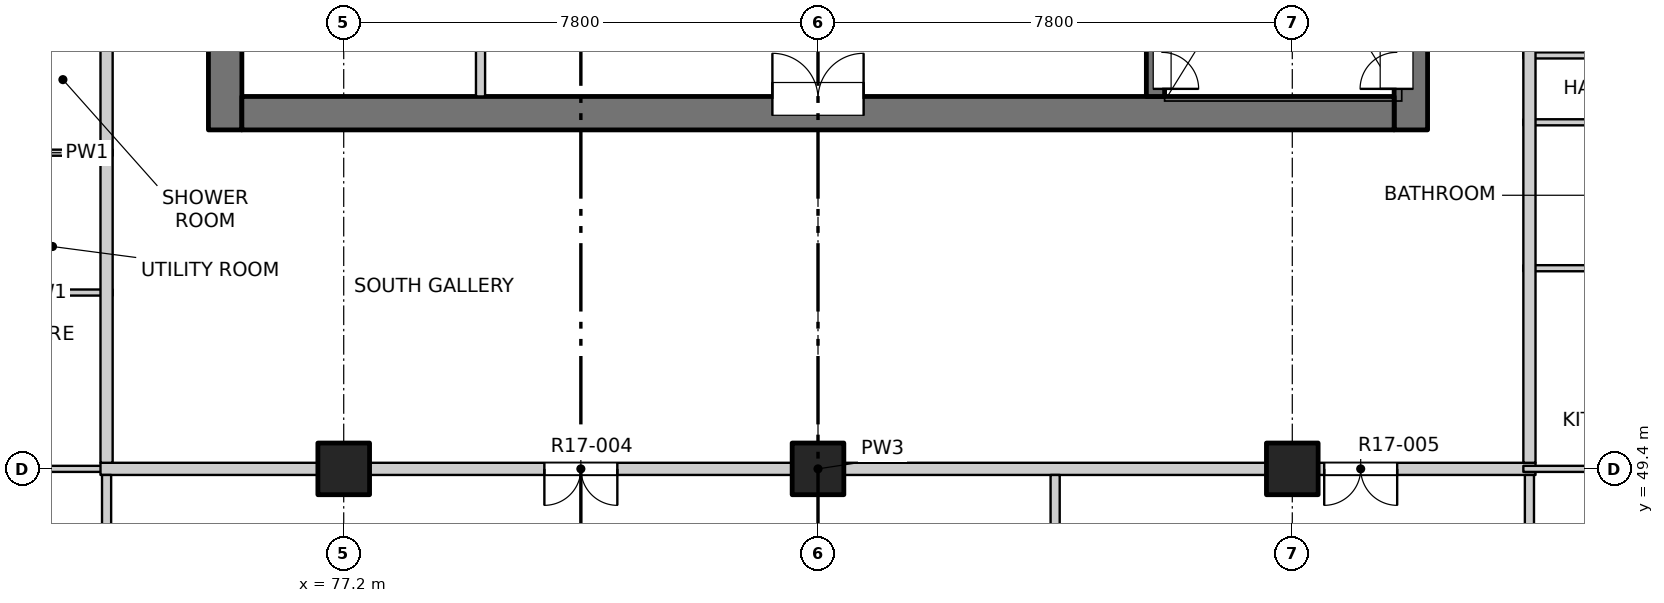
"""IFC4 building model, lengths in metres.
Left out: names, types, materials, properties, quantities, classifications, styles, units other than length and angle.
Written with IfcOpenShell. Run it as: python <this file> out.ifc"""

import sys

from ifc_helpers import new_model, si_unit, direction, frame, frame_2d, origin, origin_2d, place, context, subcontext, project, spatial, rectangle, extrude, element, fill, save


model = new_model("IFC4")
c1 = context("Model", 3, precision=1e-05, world=origin(), true_north=direction((0.0, 1.0)))
c2 = subcontext(c1, "Body", "Model", "MODEL_VIEW")
j1 = project(units=[si_unit("LENGTHUNIT", "METRE"), si_unit("PLANEANGLEUNIT", "RADIAN")], contexts=[c1])
p1 = place(None, origin())
s1 = spatial("IfcSite", under=j1, at=p1, CompositionType="ELEMENT")
p2 = place(p1, origin())
s2 = spatial("IfcBuilding", under=s1, at=p2, CompositionType="ELEMENT")
p3 = place(p2, frame((0.0, 0.0, 182.6)))
s3 = spatial("IfcBuildingStorey", under=s2, at=p3, CompositionType="ELEMENT", Elevation=182.6)
for number, where, z_axis, x_axis in (
    (1, (77.2, 49.4, -0.25), (0.0, 0.0, 1.0), (1.0, 0.0, 0.0)),
    (2, (85.0, 49.4, -0.25), (0.0, 0.0, 1.0), (1.0, 0.0, 0.0)),
    (3, (92.8, 49.4, -0.25), (0.0, 0.0, 1.0), (1.0, 0.0, 0.0)),
):
    element("IfcColumn", number, at=place(p3, frame(where, z_axis=z_axis, x_axis=x_axis)), inside=s3, PredefinedType="COLUMN", context=c2, shape_type="SweptSolid", body=[
        extrude(rectangle(XDim=0.85, YDim=0.85, at=origin_2d()), origin(), (0.0, 0.0, 1.0), 3.4),
    ])
p4 = place(p3, frame((75.25, 54.975, -0.25), z_axis=(0.0, 0.0, 1.0), x_axis=(0.0, 1.0, 0.0)))
e4 = element("IfcWall", 4, at=p4, inside=s3, PredefinedType="SOLIDWALL", context=c2, shape_type="SweptSolid", body=[
    extrude(rectangle(XDim=22.325, YDim=0.55, at=frame_2d((11.163, 0.0))), origin(), (0.0, 0.0, 1.0), 3.4),
])
p5 = place(p4, frame((7.475, 0.0, 0.25)))
e5 = element("IfcOpeningElement", 5, at=p5, cuts=e4, PredefinedType="OPENING", context=c2, shape_type="SweptSolid", body=[
    extrude(rectangle(XDim=0.9, YDim=2.1, at=frame_2d((0.45, 1.05))), frame((0.0, 0.285, 0.0), z_axis=(0.0, -1.0, 0.0), x_axis=(1.0, 0.0, 0.0)), (0.0, 0.0, 1.0), 0.57),
])
p6 = place(p4, frame((10.775, 0.0, 0.25)))
e6 = element("IfcOpeningElement", 6, at=p6, cuts=e4, PredefinedType="OPENING", context=c2, shape_type="SweptSolid", body=[
    extrude(rectangle(XDim=0.9, YDim=2.1, at=frame_2d((0.45, 1.05))), frame((0.0, 0.285, 0.0), z_axis=(0.0, -1.0, 0.0), x_axis=(1.0, 0.0, 0.0)), (0.0, 0.0, 1.0), 0.57),
])
p7 = place(p4, frame((15.275, 0.0, 0.25)))
e7 = element("IfcOpeningElement", 7, at=p7, cuts=e4, PredefinedType="OPENING", context=c2, shape_type="SweptSolid", body=[
    extrude(rectangle(XDim=0.9, YDim=2.1, at=frame_2d((0.45, 1.05))), frame((0.0, 0.285, 0.0), z_axis=(0.0, -1.0, 0.0), x_axis=(1.0, 0.0, 0.0)), (0.0, 0.0, 1.0), 0.57),
])
p8 = place(p4, frame((20.075, 0.0, 0.25)))
e8 = element("IfcOpeningElement", 8, at=p8, cuts=e4, PredefinedType="OPENING", context=c2, shape_type="SweptSolid", body=[
    extrude(rectangle(XDim=0.9, YDim=2.1, at=frame_2d((0.45, 1.05))), frame((0.0, 0.285, 0.0), z_axis=(0.0, -1.0, 0.0), x_axis=(1.0, 0.0, 0.0)), (0.0, 0.0, 1.0), 0.57),
])
p9 = place(p3, frame((94.75, 54.975, -0.25), z_axis=(0.0, 0.0, 1.0), x_axis=(0.0, 1.0, 0.0)))
e9 = element("IfcWall", 9, at=p9, inside=s3, PredefinedType="SOLIDWALL", context=c2, shape_type="SweptSolid", body=[
    extrude(rectangle(XDim=6.975, YDim=0.55, at=frame_2d((3.487, 0.0))), origin(), (0.0, 0.0, 1.0), 3.4),
])
p10 = place(p9, frame((0.675, 0.0, 0.25)))
e10 = element("IfcOpeningElement", 10, at=p10, cuts=e9, PredefinedType="OPENING", context=c2, shape_type="SweptSolid", body=[
    extrude(rectangle(XDim=1.2, YDim=2.1, at=frame_2d((0.6, 1.05))), frame((0.0, 0.285, 0.0), z_axis=(0.0, -1.0, 0.0), x_axis=(1.0, 0.0, 0.0)), (0.0, 0.0, 1.0), 0.57),
])
p11 = place(p3, frame((75.525, 55.25, -0.25), z_axis=(0.0, 0.0, 1.0), x_axis=(1.0, 0.0, 0.0)))
e11 = element("IfcWall", 11, at=p11, inside=s3, PredefinedType="SOLIDWALL", context=c2, shape_type="SweptSolid", body=[
    extrude(rectangle(XDim=18.95, YDim=0.55, at=frame_2d((9.475, 0.0))), origin(), (0.0, 0.0, 1.0), 3.4),
])
p12 = place(p11, frame((8.725, 0.0, 0.25)))
e12 = element("IfcOpeningElement", 12, at=p12, cuts=e11, PredefinedType="OPENING", context=c2, shape_type="SweptSolid", body=[
    extrude(rectangle(XDim=1.5, YDim=2.1, at=frame_2d((0.75, 1.05))), frame((0.0, 0.285, 0.0), z_axis=(0.0, -1.0, 0.0), x_axis=(1.0, 0.0, 0.0)), (0.0, 0.0, 1.0), 0.57),
])
p13 = place(p3, frame((90.55, 55.525, -0.25), z_axis=(0.0, 0.0, 1.0), x_axis=(0.0, 1.0, 0.0)))
e13 = element("IfcWall", 13, at=p13, inside=s3, PredefinedType="SOLIDWALL", context=c2, shape_type="SweptSolid", body=[
    extrude(rectangle(XDim=6.425, YDim=0.3, at=frame_2d((3.212, 0.0))), origin(), (0.0, 0.0, 1.0), 3.4),
])
p14 = place(p13, frame((0.125, 0.0, 0.25)))
e14 = element("IfcOpeningElement", 14, at=p14, cuts=e13, PredefinedType="OPENING", context=c2, shape_type="SweptSolid", body=[
    extrude(rectangle(XDim=1.2, YDim=2.1, at=frame_2d((0.6, 1.05))), frame((0.0, 0.16, 0.0), z_axis=(0.0, -1.0, 0.0), x_axis=(1.0, 0.0, 0.0)), (0.0, 0.0, 1.0), 0.32),
])
p15 = place(p3, frame((65.8, 49.4, 0.0), z_axis=(0.0, 0.0, 1.0), x_axis=(1.0, 0.0, 0.0)))
e15 = element("IfcWall", 15, at=p15, inside=s3, PredefinedType="PARTITIONING", context=c2, shape_type="SweptSolid", body=[
    extrude(rectangle(XDim=7.6, YDim=0.1, at=frame_2d((3.8, 0.0))), origin(), (0.0, 0.0, 1.0), 3.15),
])
p16 = place(p15, frame((4.14, 0.0, 0.0)))
e16 = element("IfcOpeningElement", 16, at=p16, cuts=e15, PredefinedType="OPENING", context=c2, shape_type="SweptSolid", body=[
    extrude(rectangle(XDim=0.9, YDim=2.1, at=frame_2d((0.45, 1.05))), frame((0.0, 0.06, 0.0), z_axis=(0.0, -1.0, 0.0), x_axis=(1.0, 0.0, 0.0)), (0.0, 0.0, 1.0), 0.12),
])
p17 = place(p3, frame((73.2, 49.4, 0.0), z_axis=(0.0, 0.0, 1.0), x_axis=(1.0, 0.0, 0.0)))
e17 = element("IfcWall", 17, at=p17, inside=s3, PredefinedType="PARTITIONING", context=c2, shape_type="SweptSolid", body=[
    extrude(rectangle(XDim=23.6, YDim=0.2, at=frame_2d((11.8, 0.0))), origin(), (0.0, 0.0, 1.0), 3.15),
])
p18 = place(p17, frame((7.3, 0.0, 0.0)))
e18 = element("IfcOpeningElement", 18, at=p18, cuts=e17, PredefinedType="OPENING", context=c2, shape_type="SweptSolid", body=[
    extrude(rectangle(XDim=1.2, YDim=2.1, at=frame_2d((0.6, 1.05))), frame((0.0, 0.11, 0.0), z_axis=(0.0, -1.0, 0.0), x_axis=(1.0, 0.0, 0.0)), (0.0, 0.0, 1.0), 0.22),
])
p19 = place(p17, frame((20.125, 0.0, 0.0)))
e19 = element("IfcOpeningElement", 19, at=p19, cuts=e17, PredefinedType="OPENING", context=c2, shape_type="SweptSolid", body=[
    extrude(rectangle(XDim=1.2, YDim=2.1, at=frame_2d((0.6, 1.05))), frame((0.0, 0.11, 0.0), z_axis=(0.0, -1.0, 0.0), x_axis=(1.0, 0.0, 0.0)), (0.0, 0.0, 1.0), 0.22),
])
p20 = place(p3, frame((96.6, 49.4, 0.0), z_axis=(0.0, 0.0, 1.0), x_axis=(1.0, 0.0, 0.0)))
e20 = element("IfcWall", 20, at=p20, inside=s3, PredefinedType="PARTITIONING", context=c2, shape_type="SweptSolid", body=[
    extrude(rectangle(XDim=7.6, YDim=0.1, at=frame_2d((3.8, 0.0))), origin(), (0.0, 0.0, 1.0), 3.15),
])
p21 = place(p20, frame((2.56, 0.0, 0.0)))
e21 = element("IfcOpeningElement", 21, at=p21, cuts=e20, PredefinedType="OPENING", context=c2, shape_type="SweptSolid", body=[
    extrude(rectangle(XDim=0.9, YDim=2.1, at=frame_2d((0.45, 1.05))), frame((0.0, 0.06, 0.0), z_axis=(0.0, -1.0, 0.0), x_axis=(1.0, 0.0, 0.0)), (0.0, 0.0, 1.0), 0.12),
])
for number, where, z_axis, x_axis in (
    (22, (71.18, 52.3, 0.0), (0.0, 0.0, 1.0), (1.0, 0.0, 0.0)),
    (23, (96.6, 52.7, 0.0), (0.0, 0.0, 1.0), (1.0, 0.0, 0.0)),
    (24, (71.18, 54.6, 0.0), (0.0, 0.0, 1.0), (1.0, 0.0, 0.0)),
    (25, (96.6, 55.1, 0.0), (0.0, 0.0, 1.0), (1.0, 0.0, 0.0)),
    (26, (96.6, 56.2, 0.0), (0.0, 0.0, 1.0), (1.0, 0.0, 0.0)),
):
    element("IfcWall", number, at=place(p3, frame(where, z_axis=z_axis, x_axis=x_axis)), inside=s3, PredefinedType="PARTITIONING", context=c2, shape_type="SweptSolid", body=[
        extrude(rectangle(XDim=2.22, YDim=0.1, at=frame_2d((1.11, 0.0))), origin(), (0.0, 0.0, 1.0), 3.15),
    ])
p22 = place(p3, frame((73.3, 45.8, 0.0), z_axis=(0.0, 0.0, 1.0), x_axis=(0.0, 1.0, 0.0)))
e27 = element("IfcWall", 27, at=p22, inside=s3, PredefinedType="PARTITIONING", context=c2, shape_type="SweptSolid", body=[
    extrude(rectangle(XDim=3.5, YDim=0.15, at=frame_2d((1.75, 0.0))), origin(), (0.0, 0.0, 1.0), 3.15),
])
p23 = place(p3, frame((73.3, 49.5, 0.0), z_axis=(0.0, 0.0, 1.0), x_axis=(0.0, 1.0, 0.0)))
e28 = element("IfcWall", 28, at=p23, inside=s3, PredefinedType="PARTITIONING", context=c2, shape_type="SweptSolid", body=[
    extrude(rectangle(XDim=34.7, YDim=0.2, at=frame_2d((17.35, 0.0))), origin(), (0.0, 0.0, 1.0), 3.15),
])
p24 = place(p23, frame((10.575, 0.0, 0.0)))
e29 = element("IfcOpeningElement", 29, at=p24, cuts=e28, PredefinedType="OPENING", context=c2, shape_type="SweptSolid", body=[
    extrude(rectangle(XDim=1.0, YDim=2.1, at=frame_2d((0.5, 1.05))), frame((0.0, 0.11, 0.0), z_axis=(0.0, -1.0, 0.0), x_axis=(1.0, 0.0, 0.0)), (0.0, 0.0, 1.0), 0.22),
])
p25 = place(p23, frame((18.825, 0.0, 0.0)))
e30 = element("IfcOpeningElement", 30, at=p25, cuts=e28, PredefinedType="OPENING", context=c2, shape_type="SweptSolid", body=[
    extrude(rectangle(XDim=1.0, YDim=2.1, at=frame_2d((0.5, 1.05))), frame((0.0, 0.11, 0.0), z_axis=(0.0, -1.0, 0.0), x_axis=(1.0, 0.0, 0.0)), (0.0, 0.0, 1.0), 0.22),
])
p26 = place(p23, frame((29.075, 0.0, 0.0)))
e31 = element("IfcOpeningElement", 31, at=p26, cuts=e28, PredefinedType="OPENING", context=c2, shape_type="SweptSolid", body=[
    extrude(rectangle(XDim=1.0, YDim=2.1, at=frame_2d((0.5, 1.05))), frame((0.0, 0.11, 0.0), z_axis=(0.0, -1.0, 0.0), x_axis=(1.0, 0.0, 0.0)), (0.0, 0.0, 1.0), 0.22),
])
p27 = place(p3, frame((79.45, 55.525, 0.0), z_axis=(0.0, 0.0, 1.0), x_axis=(0.0, 1.0, 0.0)))
e32 = element("IfcWall", 32, at=p27, inside=s3, PredefinedType="PARTITIONING", context=c2, shape_type="SweptSolid", body=[
    extrude(rectangle(XDim=5.375, YDim=0.15, at=frame_2d((2.688, 0.0))), origin(), (0.0, 0.0, 1.0), 3.15),
])
p28 = place(p27, frame((2.175, 0.0, 0.0)))
e33 = element("IfcOpeningElement", 33, at=p28, cuts=e32, PredefinedType="OPENING", context=c2, shape_type="SweptSolid", body=[
    extrude(rectangle(XDim=0.9, YDim=2.1, at=frame_2d((0.45, 1.05))), frame((0.0, 0.085, 0.0), z_axis=(0.0, -1.0, 0.0), x_axis=(1.0, 0.0, 0.0)), (0.0, 0.0, 1.0), 0.17),
])
for number, where, z_axis, x_axis in (
    (34, (88.9, 45.8, 0.0), (0.0, 0.0, 1.0), (0.0, 1.0, 0.0)),
    (35, (96.7, 45.8, 0.0), (0.0, 0.0, 1.0), (0.0, 1.0, 0.0)),
):
    element("IfcWall", number, at=place(p3, frame(where, z_axis=z_axis, x_axis=x_axis)), inside=s3, PredefinedType="PARTITIONING", context=c2, shape_type="SweptSolid", body=[
        extrude(rectangle(XDim=3.5, YDim=0.15, at=frame_2d((1.75, 0.0))), origin(), (0.0, 0.0, 1.0), 3.15),
    ])
p29 = place(p3, frame((96.7, 49.5, 0.0), z_axis=(0.0, 0.0, 1.0), x_axis=(0.0, 1.0, 0.0)))
e36 = element("IfcWall", 36, at=p29, inside=s3, PredefinedType="PARTITIONING", context=c2, shape_type="SweptSolid", body=[
    extrude(rectangle(XDim=34.7, YDim=0.2, at=frame_2d((17.35, 0.0))), origin(), (0.0, 0.0, 1.0), 3.15),
])
p30 = place(p29, frame((6.875, 0.0, 0.0)))
e37 = element("IfcOpeningElement", 37, at=p30, cuts=e36, PredefinedType="OPENING", context=c2, shape_type="SweptSolid", body=[
    extrude(rectangle(XDim=1.0, YDim=2.1, at=frame_2d((0.5, 1.05))), frame((0.0, 0.11, 0.0), z_axis=(0.0, -1.0, 0.0), x_axis=(1.0, 0.0, 0.0)), (0.0, 0.0, 1.0), 0.22),
])
p31 = place(p29, frame((21.775, 0.0, 0.0)))
e38 = element("IfcOpeningElement", 38, at=p31, cuts=e36, PredefinedType="OPENING", context=c2, shape_type="SweptSolid", body=[
    extrude(rectangle(XDim=1.0, YDim=2.1, at=frame_2d((0.5, 1.05))), frame((0.0, 0.11, 0.0), z_axis=(0.0, -1.0, 0.0), x_axis=(1.0, 0.0, 0.0)), (0.0, 0.0, 1.0), 0.22),
])
p32 = place(p29, frame((27.725, 0.0, 0.0)))
e39 = element("IfcOpeningElement", 39, at=p32, cuts=e36, PredefinedType="OPENING", context=c2, shape_type="SweptSolid", body=[
    extrude(rectangle(XDim=1.0, YDim=2.1, at=frame_2d((0.5, 1.05))), frame((0.0, 0.11, 0.0), z_axis=(0.0, -1.0, 0.0), x_axis=(1.0, 0.0, 0.0)), (0.0, 0.0, 1.0), 0.22),
])
p33 = place(p18, origin())
e40 = element("IfcDoor", 40, at=p33, inside=s3, OperationType="DOUBLE_DOOR_SINGLE_SWING", PredefinedType="DOOR", context=c2, shape_type="SweptSolid", body=[
    extrude(rectangle(XDim=1.2, YDim=2.1, at=frame_2d((0.6, 1.05))), frame((0.0, 0.025, 0.0), z_axis=(0.0, -1.0, 0.0), x_axis=(1.0, 0.0, 0.0)), (0.0, 0.0, 1.0), 0.05),
])
fill(e18, e40)
p34 = place(p19, origin())
e41 = element("IfcDoor", 41, at=p34, inside=s3, OperationType="DOUBLE_DOOR_SINGLE_SWING", PredefinedType="DOOR", context=c2, shape_type="SweptSolid", body=[
    extrude(rectangle(XDim=1.2, YDim=2.1, at=frame_2d((0.6, 1.05))), frame((0.0, 0.025, 0.0), z_axis=(0.0, -1.0, 0.0), x_axis=(1.0, 0.0, 0.0)), (0.0, 0.0, 1.0), 0.05),
])
fill(e19, e41)
p35 = place(p12, origin())
e42 = element("IfcDoor", 42, at=p35, inside=s3, OperationType="DOUBLE_DOOR_SINGLE_SWING", PredefinedType="DOOR", context=c2, shape_type="SweptSolid", body=[
    extrude(rectangle(XDim=1.5, YDim=2.1, at=frame_2d((0.75, 1.05))), frame((0.0, 0.26, 0.0), z_axis=(0.0, -1.0, 0.0), x_axis=(1.0, 0.0, 0.0)), (0.0, 0.0, 1.0), 0.05),
])
fill(e12, e42)
p36 = place(p14, origin())
e43 = element("IfcDoor", 43, at=p36, inside=s3, OperationType="DOUBLE_DOOR_SINGLE_SWING", PredefinedType="DOOR", context=c2, shape_type="SweptSolid", body=[
    extrude(rectangle(XDim=1.2, YDim=2.1, at=frame_2d((0.6, 1.05))), frame((0.0, -0.085, 0.0), z_axis=(0.0, -1.0, 0.0), x_axis=(1.0, 0.0, 0.0)), (0.0, 0.0, 1.0), 0.05),
])
fill(e14, e43)
p37 = place(p10, origin())
e44 = element("IfcDoor", 44, at=p37, inside=s3, OperationType="DOUBLE_DOOR_SINGLE_SWING", PredefinedType="DOOR", context=c2, shape_type="SweptSolid", body=[
    extrude(rectangle(XDim=1.2, YDim=2.1, at=frame_2d((0.6, 1.05))), frame((0.0, 0.26, 0.0), z_axis=(0.0, -1.0, 0.0), x_axis=(1.0, 0.0, 0.0)), (0.0, 0.0, 1.0), 0.05),
])
fill(e10, e44)
save(model, sys.argv[1])
